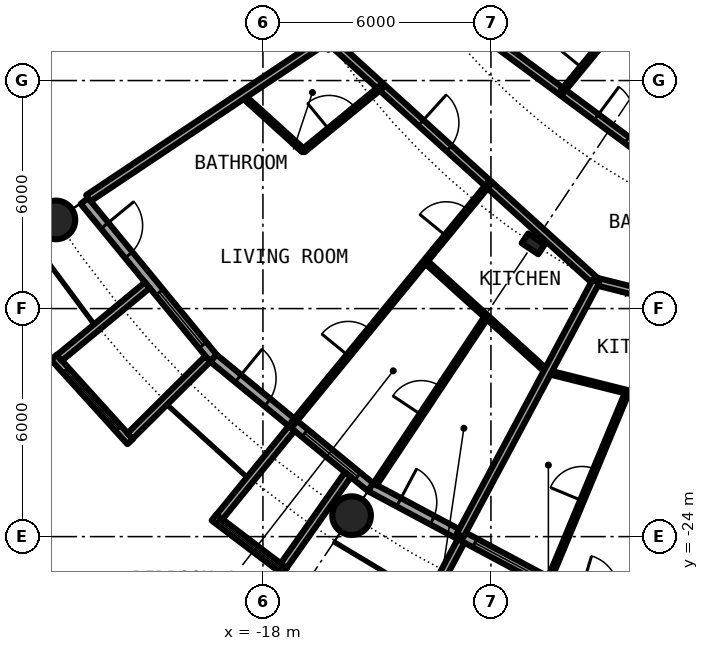
"""IFC4 building model, lengths in metres.
Left out: names, types, materials, properties, quantities, classifications, styles, units other than length and angle.
Written with IfcOpenShell. Run it as: python <this file> out.ifc"""

import sys

from ifc_helpers import new_model, si_unit, direction, frame, frame_2d, origin, origin_2d, place, context, subcontext, project, spatial, rectangle, circle, hollow_circle, i_section, extrude, element, fill, save


model = new_model("IFC4")
c1 = context("Model", 3, precision=1e-05, world=origin(), true_north=direction((0.0, 1.0)))
c2 = subcontext(c1, "Body", "Model", "MODEL_VIEW")
j1 = project(units=[si_unit("LENGTHUNIT", "METRE"), si_unit("PLANEANGLEUNIT", "RADIAN")], contexts=[c1])
p1 = place(None, origin())
s1 = spatial("IfcSite", under=j1, at=p1, CompositionType="ELEMENT")
p2 = place(p1, origin())
s2 = spatial("IfcBuilding", under=s1, at=p2, CompositionType="ELEMENT")
p3 = place(p2, frame((0.0, 0.0, 81.9)))
s3 = spatial("IfcBuildingStorey", under=s2, at=p3, CompositionType="ELEMENT", Elevation=81.9)
for number, where, z_axis, x_axis in (
    (1, (-23.448, -15.667, 0.0), (0.0, 0.0, 1.0), (1.0, 0.0, 0.0)),
    (2, (-15.667, -23.448, 0.0), (0.0, 0.0, 1.0), (1.0, 0.0, 0.0)),
):
    element("IfcColumn", number, at=place(p3, frame(where, z_axis=z_axis, x_axis=x_axis)), inside=s3, PredefinedType="COLUMN", context=c2, shape_type="SweptSolid", body=[
        extrude(hollow_circle(Radius=0.508, WallThickness=0.04, at=origin_2d()), origin(), (0.0, 0.0, 1.0), 3.05),
    ])
p4 = place(p3, frame((-10.889, -16.297, 0.0), z_axis=(0.0, 0.0, 1.0), x_axis=(-0.55557023302, -0.831469612303, 0.0)))
e3 = element("IfcColumn", 3, at=p4, inside=s3, PredefinedType="COLUMN", context=c2, shape_type="SweptSolid", body=[
    extrude(i_section(OverallWidth=0.306, OverallDepth=0.524, WebThickness=0.021, FlangeThickness=0.04, FilletRadius=0.027, at=origin_2d()), origin(), (0.0, 0.0, 1.0), 3.05),
])
p5 = place(p3, frame((-22.699, -15.167, 0.0), z_axis=(0.0, 0.0, 1.0), x_axis=(0.634382322723, -0.773019449054, 0.0)))
e4 = element("IfcWall", 4, at=p5, inside=s3, PredefinedType="SOLIDWALL", context=c2, shape_type="SweptSolid", body=[
    extrude(rectangle(XDim=5.352, YDim=0.25, at=frame_2d((2.676, 0.0))), origin(), (0.0, 0.0, 1.0), 2.7),
])
p6 = place(p5, frame((0.841, 0.0, 0.0)))
e5 = element("IfcOpeningElement", 5, at=p6, cuts=e4, PredefinedType="OPENING", context=c2, shape_type="SweptSolid", body=[
    extrude(rectangle(XDim=1.0, YDim=2.2, at=frame_2d((0.5, 1.1))), frame((0.0, 0.135, 0.0), z_axis=(0.0, -1.0, 0.0), x_axis=(1.0, 0.0, 0.0)), (0.0, 0.0, 1.0), 0.27),
])
p7 = place(p5, frame((3.111, 0.0, 0.3)))
e6 = element("IfcOpeningElement", 6, at=p7, cuts=e4, PredefinedType="OPENING", context=c2, shape_type="SweptSolid", body=[
    extrude(rectangle(XDim=1.8, YDim=2.1, at=frame_2d((0.9, 1.05))), frame((0.0, 0.135, 0.0), z_axis=(0.0, -1.0, 0.0), x_axis=(1.0, 0.0, 0.0)), (0.0, 0.0, 1.0), 0.27),
])
p8 = place(p3, frame((-23.503, -19.282, -0.03), z_axis=(0.0, 0.0, 1.0), x_axis=(0.671506829416, -0.740998365753, 0.0)))
e7 = element("IfcWall", 7, at=p8, inside=s3, PredefinedType="SOLIDWALL", context=c2, shape_type="SweptSolid", body=[
    extrude(rectangle(XDim=2.993, YDim=0.2, at=frame_2d((1.497, 0.0))), origin(), (0.0, 0.0, 1.0), 2.73),
])
p9 = place(p8, frame((0.457, 0.0, 0.33)))
e8 = element("IfcOpeningElement", 8, at=p9, cuts=e7, PredefinedType="OPENING", context=c2, shape_type="SweptSolid", body=[
    extrude(circle(Radius=1.04, at=frame_2d((1.04, 1.04))), frame((0.0, 0.11, 0.0), z_axis=(0.0, -1.0, 0.0), x_axis=(1.0, 0.0, 0.0)), (0.0, 0.0, 1.0), 0.22),
])
p10 = place(p3, frame((-21.041, -17.384, -0.03), z_axis=(0.0, 0.0, 1.0), x_axis=(-0.770784861449, -0.63709551667, 0.0)))
e9 = element("IfcWall", 9, at=p10, inside=s3, PredefinedType="SOLIDWALL", context=c2, shape_type="SweptSolid", body=[
    extrude(rectangle(XDim=3.006, YDim=0.2, at=frame_2d((1.503, 0.0))), origin(), (0.0, 0.0, 1.0), 2.73),
])
p11 = place(p3, frame((-19.45, -19.323, -0.03), z_axis=(0.0, 0.0, 1.0), x_axis=(-0.709727076896, -0.704476739375, 0.0)))
e10 = element("IfcWall", 10, at=p11, inside=s3, PredefinedType="SOLIDWALL", context=c2, shape_type="SweptSolid", body=[
    extrude(rectangle(XDim=2.883, YDim=0.2, at=frame_2d((1.441, 0.0))), origin(), (0.0, 0.0, 1.0), 2.73),
])
p12 = place(p3, frame((-19.304, -19.304, 0.0), z_axis=(0.0, 0.0, 1.0), x_axis=(0.773019449054, -0.634382322723, 0.0)))
e11 = element("IfcWall", 11, at=p12, inside=s3, PredefinedType="SOLIDWALL", context=c2, shape_type="SweptSolid", body=[
    extrude(rectangle(XDim=5.352, YDim=0.25, at=frame_2d((2.676, 0.0))), origin(), (0.0, 0.0, 1.0), 2.7),
])
p13 = place(p12, frame((0.841, 0.0, 0.0)))
e12 = element("IfcOpeningElement", 12, at=p13, cuts=e11, PredefinedType="OPENING", context=c2, shape_type="SweptSolid", body=[
    extrude(rectangle(XDim=1.0, YDim=2.2, at=frame_2d((0.5, 1.1))), frame((0.0, 0.135, 0.0), z_axis=(0.0, -1.0, 0.0), x_axis=(1.0, 0.0, 0.0)), (0.0, 0.0, 1.0), 0.27),
])
p14 = place(p12, frame((3.111, 0.0, 0.3)))
e13 = element("IfcOpeningElement", 13, at=p14, cuts=e11, PredefinedType="OPENING", context=c2, shape_type="SweptSolid", body=[
    extrude(rectangle(XDim=1.8, YDim=2.1, at=frame_2d((0.9, 1.05))), frame((0.0, 0.135, 0.0), z_axis=(0.0, -1.0, 0.0), x_axis=(1.0, 0.0, 0.0)), (0.0, 0.0, 1.0), 0.27),
])
p15 = place(p3, frame((-19.289, -23.497, -0.03), z_axis=(0.0, 0.0, 1.0), x_axis=(0.796842165306, -0.60418752353, 0.0)))
e14 = element("IfcWall", 14, at=p15, inside=s3, PredefinedType="SOLIDWALL", context=c2, shape_type="SweptSolid", body=[
    extrude(rectangle(XDim=2.337, YDim=0.2, at=frame_2d((1.168, 0.0))), origin(), (0.0, 0.0, 1.0), 2.73),
])
p16 = place(p15, frame((0.128, 0.0, 0.33)))
e15 = element("IfcOpeningElement", 15, at=p16, cuts=e14, PredefinedType="OPENING", context=c2, shape_type="SweptSolid", body=[
    extrude(circle(Radius=1.04, at=frame_2d((1.04, 1.04))), frame((0.0, 0.11, 0.0), z_axis=(0.0, -1.0, 0.0), x_axis=(1.0, 0.0, 0.0)), (0.0, 0.0, 1.0), 0.22),
])
p17 = place(p3, frame((-17.246, -21.155, -0.03), z_axis=(0.0, 0.0, 1.0), x_axis=(-0.631741648902, -0.775179004516, 0.0)))
e16 = element("IfcWall", 16, at=p17, inside=s3, PredefinedType="SOLIDWALL", context=c2, shape_type="SweptSolid", body=[
    extrude(rectangle(XDim=3.006, YDim=0.2, at=frame_2d((1.503, 0.0))), origin(), (0.0, 0.0, 1.0), 2.73),
])
p18 = place(p3, frame((-15.765, -22.37, -0.03), z_axis=(0.0, 0.0, 1.0), x_axis=(-0.576274612209, -0.817256123454, 0.0)))
e17 = element("IfcWall", 17, at=p18, inside=s3, PredefinedType="SOLIDWALL", context=c2, shape_type="SweptSolid", body=[
    extrude(rectangle(XDim=2.933, YDim=0.2, at=frame_2d((1.466, 0.0))), origin(), (0.0, 0.0, 1.0), 2.73),
])
p19 = place(p3, frame((-15.167, -22.699, 0.0), z_axis=(0.0, 0.0, 1.0), x_axis=(0.881915646801, -0.471407246368, 0.0)))
e18 = element("IfcWall", 18, at=p19, inside=s3, PredefinedType="SOLIDWALL", context=c2, shape_type="SweptSolid", body=[
    extrude(rectangle(XDim=5.352, YDim=0.25, at=frame_2d((2.676, 0.0))), origin(), (0.0, 0.0, 1.0), 2.7),
])
p20 = place(p19, frame((0.841, 0.0, 0.0)))
e19 = element("IfcOpeningElement", 19, at=p20, cuts=e18, PredefinedType="OPENING", context=c2, shape_type="SweptSolid", body=[
    extrude(rectangle(XDim=1.0, YDim=2.2, at=frame_2d((0.5, 1.1))), frame((0.0, 0.135, 0.0), z_axis=(0.0, -1.0, 0.0), x_axis=(1.0, 0.0, 0.0)), (0.0, 0.0, 1.0), 0.27),
])
p21 = place(p19, frame((3.111, 0.0, 0.3)))
e20 = element("IfcOpeningElement", 20, at=p21, cuts=e18, PredefinedType="OPENING", context=c2, shape_type="SweptSolid", body=[
    extrude(rectangle(XDim=1.8, YDim=2.1, at=frame_2d((0.9, 1.05))), frame((0.0, 0.135, 0.0), z_axis=(0.0, -1.0, 0.0), x_axis=(1.0, 0.0, 0.0)), (0.0, 0.0, 1.0), 0.27),
])
p22 = place(p3, frame((-12.787, -24.113, -0.03), z_axis=(0.0, 0.0, 1.0), x_axis=(-0.468365282436, -0.883534924159, 0.0)))
e21 = element("IfcWall", 21, at=p22, inside=s3, PredefinedType="SOLIDWALL", context=c2, shape_type="SweptSolid", body=[
    extrude(rectangle(XDim=3.006, YDim=0.2, at=frame_2d((1.503, 0.0))), origin(), (0.0, 0.0, 1.0), 2.73),
])
p23 = place(p3, frame((-18.542, -12.389, 0.0), z_axis=(0.0, 0.0, 1.0), x_axis=(0.740836325503, -0.671685595212, 0.0)))
e22 = element("IfcWall", 22, at=p23, inside=s3, PredefinedType="PARTITIONING", context=c2, shape_type="SweptSolid", body=[
    extrude(rectangle(XDim=2.168, YDim=0.1, at=frame_2d((1.084, 0.0))), origin(), (0.0, 0.0, 1.0), 2.7),
])
p24 = place(p3, frame((-13.727, -16.754, 0.0), z_axis=(0.0, 0.0, 1.0), x_axis=(0.740840803797, -0.671680655839, 0.0)))
e23 = element("IfcWall", 23, at=p24, inside=s3, PredefinedType="PARTITIONING", context=c2, shape_type="SweptSolid", body=[
    extrude(rectangle(XDim=4.338, YDim=0.1, at=frame_2d((2.169, 0.0))), origin(), (0.0, 0.0, 1.0), 2.7),
])
p25 = place(p3, frame((-10.516, -19.666, 0.0), z_axis=(0.0, 0.0, 1.0), x_axis=(0.97005315629, -0.242892721118, 0.0)))
e24 = element("IfcWall", 24, at=p25, inside=s3, PredefinedType="PARTITIONING", context=c2, shape_type="SweptSolid", body=[
    extrude(rectangle(XDim=4.343, YDim=0.1, at=frame_2d((2.172, 0.0))), origin(), (0.0, 0.0, 1.0), 2.7),
])
p26 = place(p3, frame((-16.179, -10.995, 0.0), z_axis=(0.0, 0.0, 1.0), x_axis=(0.740909940942, -0.671604392044, 0.0)))
e25 = element("IfcWall", 25, at=p26, inside=s3, PredefinedType="PARTITIONING", context=c2, shape_type="SweptSolid", body=[
    extrude(rectangle(XDim=9.367, YDim=0.2, at=frame_2d((4.683, 0.0))), origin(), (0.0, 0.0, 1.0), 2.38),
])
p27 = place(p26, frame((3.152, 0.0, 0.0)))
e26 = element("IfcOpeningElement", 26, at=p27, cuts=e25, PredefinedType="OPENING", context=c2, shape_type="SweptSolid", body=[
    extrude(rectangle(XDim=1.0, YDim=2.3, at=frame_2d((0.5, 1.15))), frame((0.0, 0.11, 0.0), z_axis=(0.0, -1.0, 0.0), x_axis=(1.0, 0.0, 0.0)), (0.0, 0.0, 1.0), 0.22),
])
p28 = place(p3, frame((-9.242, -17.284, 0.0), z_axis=(0.0, 0.0, 1.0), x_axis=(0.970002158938, -0.243096301198, 0.0)))
e27 = element("IfcWall", 27, at=p28, inside=s3, PredefinedType="PARTITIONING", context=c2, shape_type="SweptSolid", body=[
    extrude(rectangle(XDim=9.528, YDim=0.2, at=frame_2d((4.764, 0.0))), origin(), (0.0, 0.0, 1.0), 2.38),
])
p29 = place(p28, frame((6.062, 0.0, 0.0)))
e28 = element("IfcOpeningElement", 28, at=p29, cuts=e27, PredefinedType="OPENING", context=c2, shape_type="SweptSolid", body=[
    extrude(rectangle(XDim=1.0, YDim=2.3, at=frame_2d((0.5, 1.15))), frame((0.0, 0.11, 0.0), z_axis=(0.0, -1.0, 0.0), x_axis=(1.0, 0.0, 0.0)), (0.0, 0.0, 1.0), 0.22),
])
p30 = place(p3, frame((-14.052, -9.389, 0.0), z_axis=(0.0, 0.0, 1.0), x_axis=(0.803204584823, -0.59570327758, 0.0)))
e29 = element("IfcWall", 29, at=p30, inside=s3, PredefinedType="PARTITIONING", context=c2, shape_type="SweptSolid", body=[
    extrude(rectangle(XDim=11.387, YDim=0.2, at=frame_2d((5.693, 0.0))), origin(), (0.0, 0.0, 1.0), 2.7),
])
p31 = place(p30, frame((6.007, 0.0, 0.0)))
e30 = element("IfcOpeningElement", 30, at=p31, cuts=e29, PredefinedType="OPENING", context=c2, shape_type="SweptSolid", body=[
    extrude(rectangle(XDim=1.0, YDim=2.3, at=frame_2d((0.5, 1.15))), frame((0.0, 0.11, 0.0), z_axis=(0.0, -1.0, 0.0), x_axis=(1.0, 0.0, 0.0)), (0.0, 0.0, 1.0), 0.22),
])
p32 = place(p3, frame((-22.595, -15.097, 0.0), z_axis=(0.0, 0.0, 1.0), x_axis=(0.831505405283, 0.555516661303, 0.0)))
e31 = element("IfcWall", 31, at=p32, inside=s3, PredefinedType="PARTITIONING", context=c2, shape_type="SweptSolid", body=[
    extrude(rectangle(XDim=7.312, YDim=0.2, at=frame_2d((3.656, 0.0))), origin(), (0.0, 0.0, 1.0), 2.7),
])
p33 = place(p3, frame((-17.219, -21.023, 0.0), z_axis=(0.0, 0.0, 1.0), x_axis=(0.633664062855, 0.773608334654, 0.0)))
e32 = element("IfcWall", 32, at=p33, inside=s3, PredefinedType="PARTITIONING", context=c2, shape_type="SweptSolid", body=[
    extrude(rectangle(XDim=8.138, YDim=0.1, at=frame_2d((4.069, 0.0))), origin(), (0.0, 0.0, 1.0), 2.7),
])
p34 = place(p33, frame((6.377, 0.0, 0.0)))
e33 = element("IfcOpeningElement", 33, at=p34, cuts=e32, PredefinedType="OPENING", context=c2, shape_type="SweptSolid", body=[
    extrude(rectangle(XDim=0.9, YDim=2.3, at=frame_2d((0.45, 1.15))), frame((0.0, 0.06, 0.0), z_axis=(0.0, -1.0, 0.0), x_axis=(1.0, 0.0, 0.0)), (0.0, 0.0, 1.0), 0.12),
])
p35 = place(p33, frame((2.308, 0.0, 0.0)))
e34 = element("IfcOpeningElement", 34, at=p35, cuts=e32, PredefinedType="OPENING", context=c2, shape_type="SweptSolid", body=[
    extrude(rectangle(XDim=0.9, YDim=2.3, at=frame_2d((0.45, 1.15))), frame((0.0, 0.06, 0.0), z_axis=(0.0, -1.0, 0.0), x_axis=(1.0, 0.0, 0.0)), (0.0, 0.0, 1.0), 0.12),
])
p36 = place(p3, frame((-16.936, -13.845, 0.0), z_axis=(0.0, 0.0, 1.0), x_axis=(0.774162545943, 0.632986850147, 0.0)))
e35 = element("IfcWall", 35, at=p36, inside=s3, PredefinedType="PARTITIONING", context=c2, shape_type="SweptSolid", body=[
    extrude(rectangle(XDim=2.649, YDim=0.1, at=frame_2d((1.325, 0.0))), origin(), (0.0, 0.0, 1.0), 2.7),
])
p37 = place(p36, frame((0.875, 0.0, 0.0)))
e36 = element("IfcOpeningElement", 36, at=p37, cuts=e35, PredefinedType="OPENING", context=c2, shape_type="SweptSolid", body=[
    extrude(rectangle(XDim=0.9, YDim=2.3, at=frame_2d((0.45, 1.15))), frame((0.0, 0.06, 0.0), z_axis=(0.0, -1.0, 0.0), x_axis=(1.0, 0.0, 0.0)), (0.0, 0.0, 1.0), 0.12),
])
p38 = place(p3, frame((-15.051, -22.626, 0.0), z_axis=(0.0, 0.0, 1.0), x_axis=(0.553913391217, 0.832574294, 0.0)))
e37 = element("IfcWall", 37, at=p38, inside=s3, PredefinedType="PARTITIONING", context=c2, shape_type="SweptSolid", body=[
    extrude(rectangle(XDim=5.301, YDim=0.1, at=frame_2d((2.65, 0.0))), origin(), (0.0, 0.0, 1.0), 2.7),
])
p39 = place(p38, frame((2.2, 0.0, 0.0)))
e38 = element("IfcOpeningElement", 38, at=p39, cuts=e37, PredefinedType="OPENING", context=c2, shape_type="SweptSolid", body=[
    extrude(rectangle(XDim=0.9, YDim=2.3, at=frame_2d((0.45, 1.15))), frame((0.0, 0.06, 0.0), z_axis=(0.0, -1.0, 0.0), x_axis=(1.0, 0.0, 0.0)), (0.0, 0.0, 1.0), 0.12),
])
p40 = place(p3, frame((-12.81, -23.966, 0.0), z_axis=(0.0, 0.0, 1.0), x_axis=(0.471439510802, 0.881898399848, 0.0)))
e39 = element("IfcWall", 39, at=p40, inside=s3, PredefinedType="PARTITIONING", context=c2, shape_type="SweptSolid", body=[
    extrude(rectangle(XDim=7.575, YDim=0.2, at=frame_2d((3.787, 0.0))), origin(), (0.0, 0.0, 1.0), 2.7),
])
p41 = place(p3, frame((-10.45, -25.085, 0.0), z_axis=(0.0, 0.0, 1.0), x_axis=(0.384464934183, 0.923139596369, 0.0)))
e40 = element("IfcWall", 40, at=p41, inside=s3, PredefinedType="PARTITIONING", context=c2, shape_type="SweptSolid", body=[
    extrude(rectangle(XDim=5.301, YDim=0.1, at=frame_2d((2.65, 0.0))), origin(), (0.0, 0.0, 1.0), 2.7),
])
p42 = place(p41, frame((2.2, 0.0, 0.0)))
e41 = element("IfcOpeningElement", 41, at=p42, cuts=e40, PredefinedType="OPENING", context=c2, shape_type="SweptSolid", body=[
    extrude(rectangle(XDim=0.9, YDim=2.3, at=frame_2d((0.45, 1.15))), frame((0.0, 0.06, 0.0), z_axis=(0.0, -1.0, 0.0), x_axis=(1.0, 0.0, 0.0)), (0.0, 0.0, 1.0), 0.12),
])
p43 = place(p3, frame((-10.132, -12.296, 0.0), z_axis=(0.0, 0.0, 1.0), x_axis=(0.636105207978, 0.771602335652, 0.0)))
e42 = element("IfcWall", 42, at=p43, inside=s3, PredefinedType="PARTITIONING", context=c2, shape_type="SweptSolid", body=[
    extrude(rectangle(XDim=8.213, YDim=0.1, at=frame_2d((4.106, 0.0))), origin(), (0.0, 0.0, 1.0), 2.7),
])
p44 = place(p43, frame((0.821, 0.0, 0.0)))
e43 = element("IfcOpeningElement", 43, at=p44, cuts=e42, PredefinedType="OPENING", context=c2, shape_type="SweptSolid", body=[
    extrude(rectangle(XDim=0.9, YDim=2.3, at=frame_2d((0.45, 1.15))), frame((0.0, 0.06, 0.0), z_axis=(0.0, -1.0, 0.0), x_axis=(1.0, 0.0, 0.0)), (0.0, 0.0, 1.0), 0.12),
])
p45 = place(p43, frame((4.929, 0.0, 0.0)))
e44 = element("IfcOpeningElement", 44, at=p45, cuts=e42, PredefinedType="OPENING", context=c2, shape_type="SweptSolid", body=[
    extrude(rectangle(XDim=0.9, YDim=2.3, at=frame_2d((0.45, 1.15))), frame((0.0, 0.06, 0.0), z_axis=(0.0, -1.0, 0.0), x_axis=(1.0, 0.0, 0.0)), (0.0, 0.0, 1.0), 0.12),
])
p46 = place(p6, origin())
e45 = element("IfcDoor", 45, at=p46, inside=s3, OperationType="SINGLE_SWING_LEFT", PredefinedType="DOOR", context=c2, shape_type="SweptSolid", body=[
    extrude(rectangle(XDim=1.0, YDim=2.2, at=frame_2d((0.5, 1.1))), frame((0.0, 0.025, 0.0), z_axis=(0.0, -1.0, 0.0), x_axis=(1.0, 0.0, 0.0)), (0.0, 0.0, 1.0), 0.05),
])
fill(e5, e45)
p47 = place(p7, origin())
e46 = element("IfcWindow", 46, at=p47, inside=s3, PartitioningType="SINGLE_PANEL", PredefinedType="WINDOW", context=c2, shape_type="SweptSolid", body=[
    extrude(rectangle(XDim=1.8, YDim=2.1, at=frame_2d((0.9, 1.05))), frame((0.0, 0.03, 0.0), z_axis=(0.0, -1.0, 0.0), x_axis=(1.0, 0.0, 0.0)), (0.0, 0.0, 1.0), 0.06),
])
fill(e6, e46)
p48 = place(p9, origin())
e47 = element("IfcWindow", 47, at=p48, inside=s3, PartitioningType="SINGLE_PANEL", PredefinedType="WINDOW", context=c2, shape_type="SweptSolid", body=[
    extrude(circle(Radius=1.04, at=frame_2d((1.04, 1.04))), frame((0.0, 0.03, 0.0), z_axis=(0.0, -1.0, 0.0), x_axis=(1.0, 0.0, 0.0)), (0.0, 0.0, 1.0), 0.06),
])
fill(e8, e47)
p49 = place(p13, origin())
e48 = element("IfcDoor", 48, at=p49, inside=s3, OperationType="SINGLE_SWING_LEFT", PredefinedType="DOOR", context=c2, shape_type="SweptSolid", body=[
    extrude(rectangle(XDim=1.0, YDim=2.2, at=frame_2d((0.5, 1.1))), frame((0.0, 0.025, 0.0), z_axis=(0.0, -1.0, 0.0), x_axis=(1.0, 0.0, 0.0)), (0.0, 0.0, 1.0), 0.05),
])
fill(e12, e48)
p50 = place(p14, origin())
e49 = element("IfcWindow", 49, at=p50, inside=s3, PartitioningType="SINGLE_PANEL", PredefinedType="WINDOW", context=c2, shape_type="SweptSolid", body=[
    extrude(rectangle(XDim=1.8, YDim=2.1, at=frame_2d((0.9, 1.05))), frame((0.0, 0.03, 0.0), z_axis=(0.0, -1.0, 0.0), x_axis=(1.0, 0.0, 0.0)), (0.0, 0.0, 1.0), 0.06),
])
fill(e13, e49)
p51 = place(p16, origin())
e50 = element("IfcWindow", 50, at=p51, inside=s3, PartitioningType="SINGLE_PANEL", PredefinedType="WINDOW", context=c2, shape_type="SweptSolid", body=[
    extrude(circle(Radius=1.04, at=frame_2d((1.04, 1.04))), frame((0.0, 0.03, 0.0), z_axis=(0.0, -1.0, 0.0), x_axis=(1.0, 0.0, 0.0)), (0.0, 0.0, 1.0), 0.06),
])
fill(e15, e50)
p52 = place(p20, origin())
e51 = element("IfcDoor", 51, at=p52, inside=s3, OperationType="SINGLE_SWING_LEFT", PredefinedType="DOOR", context=c2, shape_type="SweptSolid", body=[
    extrude(rectangle(XDim=1.0, YDim=2.2, at=frame_2d((0.5, 1.1))), frame((0.0, 0.025, 0.0), z_axis=(0.0, -1.0, 0.0), x_axis=(1.0, 0.0, 0.0)), (0.0, 0.0, 1.0), 0.05),
])
fill(e19, e51)
p53 = place(p21, origin())
e52 = element("IfcWindow", 52, at=p53, inside=s3, PartitioningType="SINGLE_PANEL", PredefinedType="WINDOW", context=c2, shape_type="SweptSolid", body=[
    extrude(rectangle(XDim=1.8, YDim=2.1, at=frame_2d((0.9, 1.05))), frame((0.0, 0.03, 0.0), z_axis=(0.0, -1.0, 0.0), x_axis=(1.0, 0.0, 0.0)), (0.0, 0.0, 1.0), 0.06),
])
fill(e20, e52)
p54 = place(p27, origin())
e53 = element("IfcDoor", 53, at=p54, inside=s3, OperationType="SINGLE_SWING_LEFT", PredefinedType="DOOR", context=c2, shape_type="SweptSolid", body=[
    extrude(rectangle(XDim=1.0, YDim=2.3, at=frame_2d((0.5, 1.15))), frame((0.0, 0.025, 0.0), z_axis=(0.0, -1.0, 0.0), x_axis=(1.0, 0.0, 0.0)), (0.0, 0.0, 1.0), 0.05),
])
fill(e26, e53)
p55 = place(p37, origin())
e54 = element("IfcDoor", 54, at=p55, inside=s3, OperationType="SINGLE_SWING_LEFT", PredefinedType="DOOR", context=c2, shape_type="SweptSolid", body=[
    extrude(rectangle(XDim=0.9, YDim=2.3, at=frame_2d((0.45, 1.15))), frame((0.0, 0.025, 0.0), z_axis=(0.0, -1.0, 0.0), x_axis=(1.0, 0.0, 0.0)), (0.0, 0.0, 1.0), 0.05),
])
fill(e36, e54)
p56 = place(p34, origin())
e55 = element("IfcDoor", 55, at=p56, inside=s3, OperationType="SINGLE_SWING_RIGHT", PredefinedType="DOOR", context=c2, shape_type="SweptSolid", body=[
    extrude(rectangle(XDim=0.9, YDim=2.3, at=frame_2d((0.45, 1.15))), frame((0.0, 0.025, 0.0), z_axis=(0.0, -1.0, 0.0), x_axis=(1.0, 0.0, 0.0)), (0.0, 0.0, 1.0), 0.05),
])
fill(e33, e55)
p57 = place(p35, origin())
e56 = element("IfcDoor", 56, at=p57, inside=s3, OperationType="SINGLE_SWING_LEFT", PredefinedType="DOOR", context=c2, shape_type="SweptSolid", body=[
    extrude(rectangle(XDim=0.9, YDim=2.3, at=frame_2d((0.45, 1.15))), frame((0.0, 0.025, 0.0), z_axis=(0.0, -1.0, 0.0), x_axis=(1.0, 0.0, 0.0)), (0.0, 0.0, 1.0), 0.05),
])
fill(e34, e56)
p58 = place(p39, origin())
e57 = element("IfcDoor", 57, at=p58, inside=s3, OperationType="SINGLE_SWING_RIGHT", PredefinedType="DOOR", context=c2, shape_type="SweptSolid", body=[
    extrude(rectangle(XDim=0.9, YDim=2.3, at=frame_2d((0.45, 1.15))), frame((0.0, 0.025, 0.0), z_axis=(0.0, -1.0, 0.0), x_axis=(1.0, 0.0, 0.0)), (0.0, 0.0, 1.0), 0.05),
])
fill(e38, e57)
p59 = place(p42, origin())
e58 = element("IfcDoor", 58, at=p59, inside=s3, OperationType="SINGLE_SWING_RIGHT", PredefinedType="DOOR", context=c2, shape_type="SweptSolid", body=[
    extrude(rectangle(XDim=0.9, YDim=2.3, at=frame_2d((0.45, 1.15))), frame((0.0, 0.025, 0.0), z_axis=(0.0, -1.0, 0.0), x_axis=(1.0, 0.0, 0.0)), (0.0, 0.0, 1.0), 0.05),
])
fill(e41, e58)
p60 = place(p31, origin())
e59 = element("IfcDoor", 59, at=p60, inside=s3, OperationType="SINGLE_SWING_RIGHT", PredefinedType="DOOR", context=c2, shape_type="SweptSolid", body=[
    extrude(rectangle(XDim=1.0, YDim=2.3, at=frame_2d((0.5, 1.15))), frame((0.0, 0.025, 0.0), z_axis=(0.0, -1.0, 0.0), x_axis=(1.0, 0.0, 0.0)), (0.0, 0.0, 1.0), 0.05),
])
fill(e30, e59)
p61 = place(p44, origin())
e60 = element("IfcDoor", 60, at=p61, inside=s3, OperationType="SINGLE_SWING_LEFT", PredefinedType="DOOR", context=c2, shape_type="SweptSolid", body=[
    extrude(rectangle(XDim=0.9, YDim=2.3, at=frame_2d((0.45, 1.15))), frame((0.0, 0.025, 0.0), z_axis=(0.0, -1.0, 0.0), x_axis=(1.0, 0.0, 0.0)), (0.0, 0.0, 1.0), 0.05),
])
fill(e43, e60)
save(model, sys.argv[1])
